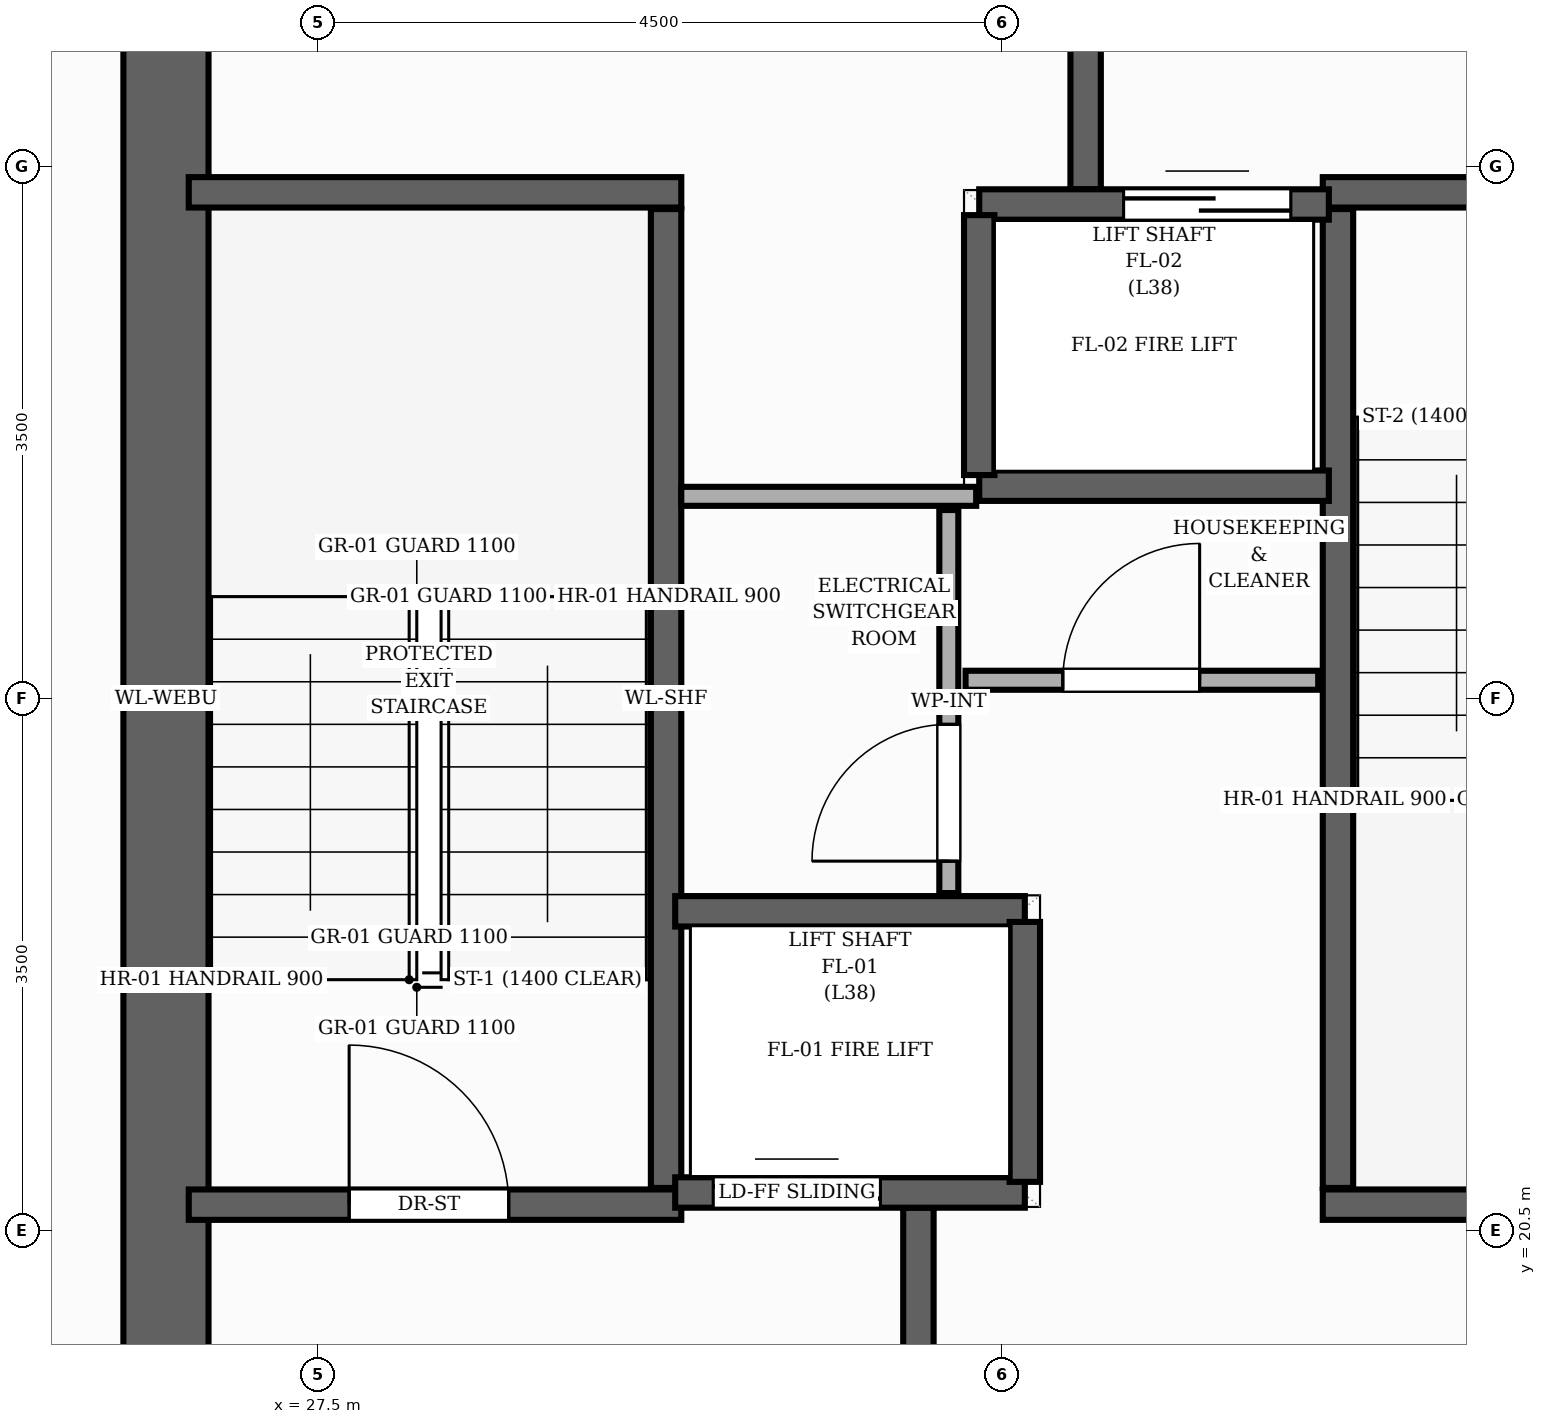
"""IFC4 building model, lengths in metres.
Left out: names, types, materials, properties, quantities, classifications, styles, units other than length and angle.
Written with IfcOpenShell. Run it as: python <this file> out.ifc"""

import sys

from ifc_helpers import new_model, si_unit, direction, frame, frame_2d, origin, place, context, subcontext, project, spatial, rectangle, extrude, element, fill, save


model = new_model("IFC4")
c1 = context("Model", 3, precision=1e-05, world=origin(), true_north=direction((0.0, 1.0)))
c2 = subcontext(c1, "Body", "Model", "MODEL_VIEW")
j1 = project(units=[si_unit("LENGTHUNIT", "METRE"), si_unit("PLANEANGLEUNIT", "RADIAN")], contexts=[c1])
p1 = place(None, origin())
s1 = spatial("IfcSite", under=j1, at=p1, CompositionType="ELEMENT")
p2 = place(p1, origin())
s2 = spatial("IfcBuilding", under=s1, at=p2, CompositionType="ELEMENT")
p3 = place(p2, frame((0.0, 0.0, 129.76)))
s3 = spatial("IfcBuildingStorey", under=s2, at=p3, CompositionType="ELEMENT", Elevation=129.76)
p4 = place(p3, frame((26.5, 17.3, 0.0), z_axis=(0.0, 0.0, 1.0), x_axis=(0.0, 1.0, 0.0)))
e1 = element("IfcWall", 1, at=p4, inside=s3, PredefinedType="SHEAR", context=c2, shape_type="SweptSolid", body=[
    extrude(rectangle(XDim=13.4, YDim=0.56, at=frame_2d((6.7, 0.0))), origin(), (0.0, 0.0, 1.0), 3.2),
])
p5 = place(p3, frame((29.79, 20.78, 0.0), z_axis=(0.0, 0.0, 1.0), x_axis=(0.0, 1.0, 0.0)))
e2 = element("IfcWall", 2, at=p5, inside=s3, PredefinedType="SHEAR", context=c2, shape_type="SweptSolid", body=[
    extrude(rectangle(XDim=6.44, YDim=0.2, at=frame_2d((3.22, 0.0))), origin(), (0.0, 0.0, 1.0), 3.2),
])
p6 = place(p3, frame((26.65, 27.33, 0.0), z_axis=(0.0, 0.0, 1.0), x_axis=(1.0, 0.0, 0.0)))
e3 = element("IfcWall", 3, at=p6, inside=s3, PredefinedType="SHEAR", context=c2, shape_type="SweptSolid", body=[
    extrude(rectangle(XDim=3.24, YDim=0.2, at=frame_2d((1.62, 0.0))), origin(), (0.0, 0.0, 1.0), 3.2),
])
p7 = place(p3, frame((26.65, 20.67, 0.0), z_axis=(0.0, 0.0, 1.0), x_axis=(1.0, 0.0, 0.0)))
e4 = element("IfcWall", 4, at=p7, inside=s3, PredefinedType="SHEAR", context=c2, shape_type="SweptSolid", body=[
    extrude(rectangle(XDim=3.24, YDim=0.2, at=frame_2d((1.62, 0.0))), origin(), (0.0, 0.0, 1.0), 3.2),
])
p8 = place(p7, frame((1.055, 0.0, 0.0)))
e5 = element("IfcOpeningElement", 5, at=p8, cuts=e4, PredefinedType="OPENING", context=c2, shape_type="SweptSolid", body=[
    extrude(rectangle(XDim=1.05, YDim=2.15, at=frame_2d((0.525, 1.075))), frame((0.0, 0.11, 0.0), z_axis=(0.0, -1.0, 0.0), x_axis=(1.0, 0.0, 0.0)), (0.0, 0.0, 1.0), 0.22),
])
p9 = place(p3, frame((34.21, 20.78, 0.0), z_axis=(0.0, 0.0, 1.0), x_axis=(0.0, 1.0, 0.0)))
e6 = element("IfcWall", 6, at=p9, inside=s3, PredefinedType="SHEAR", context=c2, shape_type="SweptSolid", body=[
    extrude(rectangle(XDim=6.44, YDim=0.2, at=frame_2d((3.22, 0.0))), origin(), (0.0, 0.0, 1.0), 3.2),
])
p10 = place(p3, frame((34.11, 20.67, 0.0), z_axis=(0.0, 0.0, 1.0), x_axis=(1.0, 0.0, 0.0)))
e7 = element("IfcWall", 7, at=p10, inside=s3, PredefinedType="SHEAR", context=c2, shape_type="SweptSolid", body=[
    extrude(rectangle(XDim=3.24, YDim=0.2, at=frame_2d((1.62, 0.0))), origin(), (0.0, 0.0, 1.0), 3.2),
])
p11 = place(p3, frame((34.11, 27.33, 0.0), z_axis=(0.0, 0.0, 1.0), x_axis=(1.0, 0.0, 0.0)))
e8 = element("IfcWall", 8, at=p11, inside=s3, PredefinedType="SHEAR", context=c2, shape_type="SweptSolid", body=[
    extrude(rectangle(XDim=3.24, YDim=0.2, at=frame_2d((1.62, 0.0))), origin(), (0.0, 0.0, 1.0), 3.2),
])
p12 = place(p11, frame((1.135, 0.0, 0.0)))
e9 = element("IfcOpeningElement", 9, at=p12, cuts=e8, PredefinedType="OPENING", context=c2, shape_type="SweptSolid", body=[
    extrude(rectangle(XDim=1.05, YDim=2.15, at=frame_2d((0.525, 1.075))), frame((0.0, 0.11, 0.0), z_axis=(0.0, -1.0, 0.0), x_axis=(1.0, 0.0, 0.0)), (0.0, 0.0, 1.0), 0.22),
])
for number, where, z_axis, x_axis in (
    (10, (31.45, 17.15, 0.0), (0.0, 0.0, 1.0), (0.0, 1.0, 0.0)),
    (11, (32.55, 27.35, 0.0), (0.0, 0.0, 1.0), (0.0, 1.0, 0.0)),
):
    element("IfcWall", number, at=place(p3, frame(where, z_axis=z_axis, x_axis=x_axis)), inside=s3, PredefinedType="SHEAR", context=c2, shape_type="SweptSolid", body=[
        extrude(rectangle(XDim=3.5, YDim=0.2, at=frame_2d((1.75, 0.0))), origin(), (0.0, 0.0, 1.0), 3.2),
    ])
p13 = place(p3, frame((29.85, 20.75, 0.0), z_axis=(0.0, 0.0, 1.0), x_axis=(1.0, 0.0, 0.0)))
e12 = element("IfcWall", 12, at=p13, inside=s3, PredefinedType="SHEAR", context=c2, shape_type="SweptSolid", body=[
    extrude(rectangle(XDim=2.3, YDim=0.2, at=frame_2d((1.15, 0.0))), origin(), (0.0, 0.0, 1.0), 3.2),
])
p14 = place(p13, frame((0.25, 0.0, 0.0)))
e13 = element("IfcOpeningElement", 13, at=p14, cuts=e12, PredefinedType="OPENING", context=c2, shape_type="SweptSolid", body=[
    extrude(rectangle(XDim=1.1, YDim=2.15, at=frame_2d((0.55, 1.075))), frame((0.0, 0.11, 0.0), z_axis=(0.0, -1.0, 0.0), x_axis=(1.0, 0.0, 0.0)), (0.0, 0.0, 1.0), 0.22),
])
p15 = place(p3, frame((29.85, 22.6, 0.0), z_axis=(0.0, 0.0, 1.0), x_axis=(1.0, 0.0, 0.0)))
e14 = element("IfcWall", 14, at=p15, inside=s3, PredefinedType="SHEAR", context=c2, shape_type="SweptSolid", body=[
    extrude(rectangle(XDim=2.3, YDim=0.2, at=frame_2d((1.15, 0.0))), origin(), (0.0, 0.0, 1.0), 3.2),
])
p16 = place(p3, frame((32.15, 20.82, 0.0), z_axis=(0.0, 0.0, 1.0), x_axis=(0.0, 1.0, 0.0)))
e15 = element("IfcWall", 15, at=p16, inside=s3, PredefinedType="SHEAR", context=c2, shape_type="SweptSolid", body=[
    extrude(rectangle(XDim=1.71, YDim=0.2, at=frame_2d((0.855, 0.0))), origin(), (0.0, 0.0, 1.0), 3.2),
])
p17 = place(p3, frame((31.85, 27.25, 0.0), z_axis=(0.0, 0.0, 1.0), x_axis=(1.0, 0.0, 0.0)))
e16 = element("IfcWall", 16, at=p17, inside=s3, PredefinedType="SHEAR", context=c2, shape_type="SweptSolid", body=[
    extrude(rectangle(XDim=2.3, YDim=0.2, at=frame_2d((1.15, 0.0))), origin(), (0.0, 0.0, 1.0), 3.2),
])
p18 = place(p17, frame((0.95, 0.0, 0.0)))
e17 = element("IfcOpeningElement", 17, at=p18, cuts=e16, PredefinedType="OPENING", context=c2, shape_type="SweptSolid", body=[
    extrude(rectangle(XDim=1.1, YDim=2.15, at=frame_2d((0.55, 1.075))), frame((0.0, 0.11, 0.0), z_axis=(0.0, -1.0, 0.0), x_axis=(1.0, 0.0, 0.0)), (0.0, 0.0, 1.0), 0.22),
])
p19 = place(p3, frame((31.85, 25.4, 0.0), z_axis=(0.0, 0.0, 1.0), x_axis=(1.0, 0.0, 0.0)))
e18 = element("IfcWall", 18, at=p19, inside=s3, PredefinedType="SHEAR", context=c2, shape_type="SweptSolid", body=[
    extrude(rectangle(XDim=2.3, YDim=0.2, at=frame_2d((1.15, 0.0))), origin(), (0.0, 0.0, 1.0), 3.2),
])
p20 = place(p3, frame((31.85, 25.47, 0.0), z_axis=(0.0, 0.0, 1.0), x_axis=(0.0, 1.0, 0.0)))
e19 = element("IfcWall", 19, at=p20, inside=s3, PredefinedType="SHEAR", context=c2, shape_type="SweptSolid", body=[
    extrude(rectangle(XDim=1.71, YDim=0.2, at=frame_2d((0.855, 0.0))), origin(), (0.0, 0.0, 1.0), 3.2),
])
p21 = place(p3, frame((31.65, 22.72, 0.0), z_axis=(0.0, 0.0, 1.0), x_axis=(0.0, 1.0, 0.0)))
e20 = element("IfcWall", 20, at=p21, inside=s3, PredefinedType="PARTITIONING", context=c2, shape_type="SweptSolid", body=[
    extrude(rectangle(XDim=2.52, YDim=0.125, at=frame_2d((1.26, 0.0))), origin(), (0.0, 0.0, 1.0), 2.955),
])
p22 = place(p21, frame((0.21, 0.0, 0.0)))
e21 = element("IfcOpeningElement", 21, at=p22, cuts=e20, PredefinedType="OPENING", context=c2, shape_type="SweptSolid", body=[
    extrude(rectangle(XDim=0.9, YDim=2.1, at=frame_2d((0.45, 1.05))), frame((0.0, 0.073, 0.0), z_axis=(0.0, -1.0, 0.0), x_axis=(1.0, 0.0, 0.0)), (0.0, 0.0, 1.0), 0.145),
])
p23 = place(p3, frame((31.76, 24.12, 0.0), z_axis=(0.0, 0.0, 1.0), x_axis=(1.0, 0.0, 0.0)))
e22 = element("IfcWall", 22, at=p23, inside=s3, PredefinedType="PARTITIONING", context=c2, shape_type="SweptSolid", body=[
    extrude(rectangle(XDim=2.32, YDim=0.125, at=frame_2d((1.16, 0.0))), origin(), (0.0, 0.0, 1.0), 2.955),
])
p24 = place(p23, frame((0.64, 0.0, 0.0)))
e23 = element("IfcOpeningElement", 23, at=p24, cuts=e22, PredefinedType="OPENING", context=c2, shape_type="SweptSolid", body=[
    extrude(rectangle(XDim=0.9, YDim=2.1, at=frame_2d((0.45, 1.05))), frame((0.0, 0.073, 0.0), z_axis=(0.0, -1.0, 0.0), x_axis=(1.0, 0.0, 0.0)), (0.0, 0.0, 1.0), 0.145),
])
p25 = place(p3, frame((29.89, 25.33, 0.0), z_axis=(0.0, 0.0, 1.0), x_axis=(1.0, 0.0, 0.0)))
e24 = element("IfcWall", 24, at=p25, inside=s3, PredefinedType="PARTITIONING", context=c2, shape_type="SweptSolid", body=[
    extrude(rectangle(XDim=1.94, YDim=0.125, at=frame_2d((0.97, 0.0))), origin(), (0.0, 0.0, 1.0), 2.955),
])
p26 = place(p8, origin())
e25 = element("IfcDoor", 25, at=p26, inside=s3, OperationType="SINGLE_SWING_LEFT", PredefinedType="DOOR", context=c2, shape_type="SweptSolid", body=[
    extrude(rectangle(XDim=1.05, YDim=2.15, at=frame_2d((0.525, 1.075))), frame((0.0, 0.025, 0.0), z_axis=(0.0, -1.0, 0.0), x_axis=(1.0, 0.0, 0.0)), (0.0, 0.0, 1.0), 0.05),
])
fill(e5, e25)
p27 = place(p14, origin())
e26 = element("IfcDoor", 26, at=p27, inside=s3, OperationType="DOUBLE_DOOR_SLIDING", PredefinedType="DOOR", context=c2, shape_type="SweptSolid", body=[
    extrude(rectangle(XDim=1.1, YDim=2.15, at=frame_2d((0.55, 1.075))), frame((0.0, 0.025, 0.0), z_axis=(0.0, -1.0, 0.0), x_axis=(1.0, 0.0, 0.0)), (0.0, 0.0, 1.0), 0.05),
])
fill(e13, e26)
p28 = place(p18, origin())
e27 = element("IfcDoor", 27, at=p28, inside=s3, OperationType="DOUBLE_DOOR_SLIDING", PredefinedType="DOOR", context=c2, shape_type="SweptSolid", body=[
    extrude(rectangle(XDim=1.1, YDim=2.15, at=frame_2d((0.55, 1.075))), frame((0.0, 0.025, 0.0), z_axis=(0.0, -1.0, 0.0), x_axis=(1.0, 0.0, 0.0)), (0.0, 0.0, 1.0), 0.05),
])
fill(e17, e27)
p29 = place(p22, origin())
e28 = element("IfcDoor", 28, at=p29, inside=s3, OperationType="SINGLE_SWING_LEFT", PredefinedType="DOOR", context=c2, shape_type="SweptSolid", body=[
    extrude(rectangle(XDim=0.9, YDim=2.1, at=frame_2d((0.45, 1.05))), frame((0.0, 0.025, 0.0), z_axis=(0.0, -1.0, 0.0), x_axis=(1.0, 0.0, 0.0)), (0.0, 0.0, 1.0), 0.05),
])
fill(e21, e28)
p30 = place(p24, origin())
e29 = element("IfcDoor", 29, at=p30, inside=s3, OperationType="SINGLE_SWING_RIGHT", PredefinedType="DOOR", context=c2, shape_type="SweptSolid", body=[
    extrude(rectangle(XDim=0.9, YDim=2.1, at=frame_2d((0.45, 1.05))), frame((0.0, 0.025, 0.0), z_axis=(0.0, -1.0, 0.0), x_axis=(1.0, 0.0, 0.0)), (0.0, 0.0, 1.0), 0.05),
])
fill(e23, e29)
save(model, sys.argv[1])
